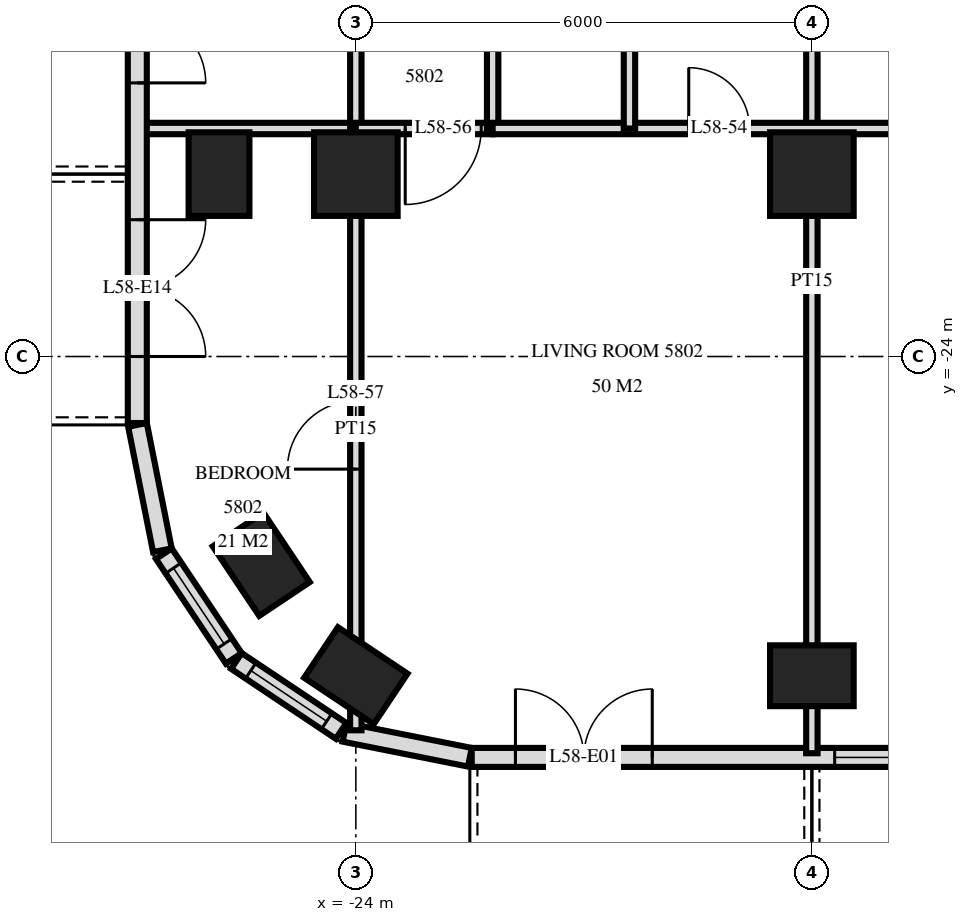
"""IFC4 building model, lengths in metres.
Left out: names, types, materials, properties, quantities, classifications, styles, units other than length and angle.
Written with IfcOpenShell. Run it as: python <this file> out.ifc"""

import sys

from ifc_helpers import new_model, si_unit, direction, frame, frame_2d, origin, origin_2d, place, context, subcontext, project, spatial, rectangle, extrude, element, fill, save


model = new_model("IFC4")
c1 = context("Model", 3, precision=1e-05, world=origin(), true_north=direction((0.0, 1.0)))
c2 = subcontext(c1, "Body", "Model", "MODEL_VIEW")
j1 = project(units=[si_unit("LENGTHUNIT", "METRE"), si_unit("PLANEANGLEUNIT", "RADIAN")], contexts=[c1])
p1 = place(None, origin())
s1 = spatial("IfcSite", under=j1, at=p1, CompositionType="ELEMENT")
p2 = place(p1, origin())
s2 = spatial("IfcBuilding", under=s1, at=p2, CompositionType="ELEMENT")
p3 = place(p2, frame((0.0, 0.0, 222.1)))
s3 = spatial("IfcBuildingStorey", under=s2, at=p3, CompositionType="ELEMENT", Elevation=222.1)
for number, where, z_axis, x_axis in (
    (1, (-25.8, -21.6, 0.0), (0.0, 0.0, 1.0), (0.0, 1.0, 0.0)),
    (2, (-25.244, -26.733, 0.0), (0.0, 0.0, 1.0), (-0.556, 0.831, 0.0)),
    (3, (-24.0, -28.2, 0.0), (0.0, 0.0, 1.0), (-0.831, 0.556, 0.0)),
):
    element("IfcColumn", number, at=place(p3, frame(where, z_axis=z_axis, x_axis=x_axis)), inside=s3, PredefinedType="COLUMN", context=c2, shape_type="SweptSolid", body=[
        extrude(rectangle(XDim=1.1, YDim=0.8, at=origin_2d()), origin(), (0.0, 0.0, 1.0), 3.5),
    ])
p4 = place(p3, frame((-24.0, -21.6, 0.0), z_axis=(0.0, 0.0, 1.0), x_axis=(1.0, 0.0, 0.0)))
e4 = element("IfcColumn", 4, at=p4, inside=s3, PredefinedType="COLUMN", context=c2, shape_type="SweptSolid", body=[
    extrude(rectangle(XDim=1.1, YDim=1.1, at=origin_2d()), origin(), (0.0, 0.0, 1.0), 3.5),
])
p5 = place(p3, frame((-18.0, -28.2, 0.0), z_axis=(0.0, 0.0, 1.0), x_axis=(1.0, 0.0, 0.0)))
e5 = element("IfcColumn", 5, at=p5, inside=s3, PredefinedType="COLUMN", context=c2, shape_type="SweptSolid", body=[
    extrude(rectangle(XDim=1.1, YDim=0.8, at=origin_2d()), origin(), (0.0, 0.0, 1.0), 3.5),
])
p6 = place(p3, frame((-18.0, -21.6, 0.0), z_axis=(0.0, 0.0, 1.0), x_axis=(1.0, 0.0, 0.0)))
e6 = element("IfcColumn", 6, at=p6, inside=s3, PredefinedType="COLUMN", context=c2, shape_type="SweptSolid", body=[
    extrude(rectangle(XDim=1.1, YDim=1.1, at=origin_2d()), origin(), (0.0, 0.0, 1.0), 3.5),
])
p7 = place(p3, frame((-26.875, -3.325, 0.0), z_axis=(0.0, 0.0, 1.0), x_axis=(0.0, -1.0, 0.0)))
e7 = element("IfcWall", 7, at=p7, inside=s3, PredefinedType="SOLIDWALL", context=c2, shape_type="SweptSolid", body=[
    extrude(rectangle(XDim=21.551, YDim=0.25, at=frame_2d((10.775, 0.0))), origin(), (0.0, 0.0, 1.0), 3.22),
])
p8 = place(p7, frame((7.275, 0.0, 0.0)))
e8 = element("IfcOpeningElement", 8, at=p8, cuts=e7, PredefinedType="OPENING", context=c2, shape_type="SweptSolid", body=[
    extrude(rectangle(XDim=1.8, YDim=2.4, at=frame_2d((0.9, 1.2))), frame((0.0, 0.135, 0.0), z_axis=(0.0, -1.0, 0.0), x_axis=(1.0, 0.0, 0.0)), (0.0, 0.0, 1.0), 0.27),
])
p9 = place(p7, frame((15.275, 0.0, 0.0)))
e9 = element("IfcOpeningElement", 9, at=p9, cuts=e7, PredefinedType="OPENING", context=c2, shape_type="SweptSolid", body=[
    extrude(rectangle(XDim=1.8, YDim=2.4, at=frame_2d((0.9, 1.2))), frame((0.0, 0.135, 0.0), z_axis=(0.0, -1.0, 0.0), x_axis=(1.0, 0.0, 0.0)), (0.0, 0.0, 1.0), 0.27),
])
p10 = place(p7, frame((18.875, 0.0, 0.0)))
e10 = element("IfcOpeningElement", 10, at=p10, cuts=e7, PredefinedType="OPENING", context=c2, shape_type="SweptSolid", body=[
    extrude(rectangle(XDim=1.8, YDim=2.4, at=frame_2d((0.9, 1.2))), frame((0.0, 0.135, 0.0), z_axis=(0.0, -1.0, 0.0), x_axis=(1.0, 0.0, 0.0)), (0.0, 0.0, 1.0), 0.27),
])
p11 = place(p3, frame((-26.873, -24.9, 0.0), z_axis=(0.0, 0.0, 1.0), x_axis=(0.195026884138, -0.980797896849, 0.0)))
e11 = element("IfcWall", 11, at=p11, inside=s3, PredefinedType="SOLIDWALL", context=c2, shape_type="SweptSolid", body=[
    extrude(rectangle(XDim=1.681, YDim=0.25, at=frame_2d((0.841, 0.0))), origin(), (0.0, 0.0, 1.0), 3.22),
])
p12 = place(p3, frame((-26.526, -26.594, 0.0), z_axis=(0.0, 0.0, 1.0), x_axis=(0.55555029066, -0.831482937015, 0.0)))
e12 = element("IfcWall", 12, at=p12, inside=s3, PredefinedType="SOLIDWALL", context=c2, shape_type="SweptSolid", body=[
    extrude(rectangle(XDim=1.656, YDim=0.25, at=frame_2d((0.828, 0.0))), origin(), (0.0, 0.0, 1.0), 3.22),
])
p13 = place(p12, frame((0.228, 0.0, 0.9)))
e13 = element("IfcOpeningElement", 13, at=p13, cuts=e12, PredefinedType="OPENING", context=c2, shape_type="SweptSolid", body=[
    extrude(rectangle(XDim=1.2, YDim=1.5, at=frame_2d((0.6, 0.75))), frame((0.0, 0.135, 0.0), z_axis=(0.0, -1.0, 0.0), x_axis=(1.0, 0.0, 0.0)), (0.0, 0.0, 1.0), 0.27),
])
p14 = place(p3, frame((-25.571, -28.006, 0.0), z_axis=(0.0, 0.0, 1.0), x_axis=(0.831482937015, -0.55555029066, 0.0)))
e14 = element("IfcWall", 14, at=p14, inside=s3, PredefinedType="SOLIDWALL", context=c2, shape_type="SweptSolid", body=[
    extrude(rectangle(XDim=1.656, YDim=0.25, at=frame_2d((0.828, 0.0))), origin(), (0.0, 0.0, 1.0), 3.22),
])
p15 = place(p14, frame((0.228, 0.0, 0.9)))
e15 = element("IfcOpeningElement", 15, at=p15, cuts=e14, PredefinedType="OPENING", context=c2, shape_type="SweptSolid", body=[
    extrude(rectangle(XDim=1.2, YDim=1.5, at=frame_2d((0.6, 0.75))), frame((0.0, 0.135, 0.0), z_axis=(0.0, -1.0, 0.0), x_axis=(1.0, 0.0, 0.0)), (0.0, 0.0, 1.0), 0.27),
])
p16 = place(p3, frame((-24.149, -28.945, 0.0), z_axis=(0.0, 0.0, 1.0), x_axis=(0.980775640221, -0.19513878023, 0.0)))
e16 = element("IfcWall", 16, at=p16, inside=s3, PredefinedType="SOLIDWALL", context=c2, shape_type="SweptSolid", body=[
    extrude(rectangle(XDim=1.681, YDim=0.25, at=frame_2d((0.841, 0.0))), origin(), (0.0, 0.0, 1.0), 3.22),
])
p17 = place(p3, frame((-22.475, -29.275, 0.0), z_axis=(0.0, 0.0, 1.0), x_axis=(1.0, 0.0, 0.0)))
e17 = element("IfcWall", 17, at=p17, inside=s3, PredefinedType="SOLIDWALL", context=c2, shape_type="SweptSolid", body=[
    extrude(rectangle(XDim=44.951, YDim=0.25, at=frame_2d((22.475, 0.0))), origin(), (0.0, 0.0, 1.0), 3.22),
])
p18 = place(p17, frame((0.575, 0.0, 0.0)))
e18 = element("IfcOpeningElement", 18, at=p18, cuts=e17, PredefinedType="OPENING", context=c2, shape_type="SweptSolid", body=[
    extrude(rectangle(XDim=1.8, YDim=2.4, at=frame_2d((0.9, 1.2))), frame((0.0, 0.135, 0.0), z_axis=(0.0, -1.0, 0.0), x_axis=(1.0, 0.0, 0.0)), (0.0, 0.0, 1.0), 0.27),
])
p19 = place(p17, frame((4.775, 0.0, 0.9)))
e19 = element("IfcOpeningElement", 19, at=p19, cuts=e17, PredefinedType="OPENING", context=c2, shape_type="SweptSolid", body=[
    extrude(rectangle(XDim=2.4, YDim=1.5, at=frame_2d((1.2, 0.75))), frame((0.0, 0.135, 0.0), z_axis=(0.0, -1.0, 0.0), x_axis=(1.0, 0.0, 0.0)), (0.0, 0.0, 1.0), 0.27),
])
p20 = place(p17, frame((8.075, 0.0, 0.0)))
e20 = element("IfcOpeningElement", 20, at=p20, cuts=e17, PredefinedType="OPENING", context=c2, shape_type="SweptSolid", body=[
    extrude(rectangle(XDim=1.8, YDim=2.4, at=frame_2d((0.9, 1.2))), frame((0.0, 0.135, 0.0), z_axis=(0.0, -1.0, 0.0), x_axis=(1.0, 0.0, 0.0)), (0.0, 0.0, 1.0), 0.27),
])
p21 = place(p17, frame((11.075, 0.0, 0.0)))
e21 = element("IfcOpeningElement", 21, at=p21, cuts=e17, PredefinedType="OPENING", context=c2, shape_type="SweptSolid", body=[
    extrude(rectangle(XDim=1.8, YDim=2.4, at=frame_2d((0.9, 1.2))), frame((0.0, 0.135, 0.0), z_axis=(0.0, -1.0, 0.0), x_axis=(1.0, 0.0, 0.0)), (0.0, 0.0, 1.0), 0.27),
])
p22 = place(p17, frame((13.775, 0.0, 0.9)))
e22 = element("IfcOpeningElement", 22, at=p22, cuts=e17, PredefinedType="OPENING", context=c2, shape_type="SweptSolid", body=[
    extrude(rectangle(XDim=2.4, YDim=1.5, at=frame_2d((1.2, 0.75))), frame((0.0, 0.135, 0.0), z_axis=(0.0, -1.0, 0.0), x_axis=(1.0, 0.0, 0.0)), (0.0, 0.0, 1.0), 0.27),
])
p23 = place(p17, frame((16.775, 0.0, 0.9)))
e23 = element("IfcOpeningElement", 23, at=p23, cuts=e17, PredefinedType="OPENING", context=c2, shape_type="SweptSolid", body=[
    extrude(rectangle(XDim=2.4, YDim=1.5, at=frame_2d((1.2, 0.75))), frame((0.0, 0.135, 0.0), z_axis=(0.0, -1.0, 0.0), x_axis=(1.0, 0.0, 0.0)), (0.0, 0.0, 1.0), 0.27),
])
p24 = place(p17, frame((20.075, 0.0, 0.0)))
e24 = element("IfcOpeningElement", 24, at=p24, cuts=e17, PredefinedType="OPENING", context=c2, shape_type="SweptSolid", body=[
    extrude(rectangle(XDim=1.8, YDim=2.4, at=frame_2d((0.9, 1.2))), frame((0.0, 0.135, 0.0), z_axis=(0.0, -1.0, 0.0), x_axis=(1.0, 0.0, 0.0)), (0.0, 0.0, 1.0), 0.27),
])
p25 = place(p17, frame((23.075, 0.0, 0.0)))
e25 = element("IfcOpeningElement", 25, at=p25, cuts=e17, PredefinedType="OPENING", context=c2, shape_type="SweptSolid", body=[
    extrude(rectangle(XDim=1.8, YDim=2.4, at=frame_2d((0.9, 1.2))), frame((0.0, 0.135, 0.0), z_axis=(0.0, -1.0, 0.0), x_axis=(1.0, 0.0, 0.0)), (0.0, 0.0, 1.0), 0.27),
])
p26 = place(p17, frame((25.775, 0.0, 0.9)))
e26 = element("IfcOpeningElement", 26, at=p26, cuts=e17, PredefinedType="OPENING", context=c2, shape_type="SweptSolid", body=[
    extrude(rectangle(XDim=2.4, YDim=1.5, at=frame_2d((1.2, 0.75))), frame((0.0, 0.135, 0.0), z_axis=(0.0, -1.0, 0.0), x_axis=(1.0, 0.0, 0.0)), (0.0, 0.0, 1.0), 0.27),
])
p27 = place(p17, frame((29.075, 0.0, 0.0)))
e27 = element("IfcOpeningElement", 27, at=p27, cuts=e17, PredefinedType="OPENING", context=c2, shape_type="SweptSolid", body=[
    extrude(rectangle(XDim=1.8, YDim=2.4, at=frame_2d((0.9, 1.2))), frame((0.0, 0.135, 0.0), z_axis=(0.0, -1.0, 0.0), x_axis=(1.0, 0.0, 0.0)), (0.0, 0.0, 1.0), 0.27),
])
p28 = place(p17, frame((31.775, 0.0, 0.9)))
e28 = element("IfcOpeningElement", 28, at=p28, cuts=e17, PredefinedType="OPENING", context=c2, shape_type="SweptSolid", body=[
    extrude(rectangle(XDim=2.4, YDim=1.5, at=frame_2d((1.2, 0.75))), frame((0.0, 0.135, 0.0), z_axis=(0.0, -1.0, 0.0), x_axis=(1.0, 0.0, 0.0)), (0.0, 0.0, 1.0), 0.27),
])
p29 = place(p17, frame((35.075, 0.0, 0.0)))
e29 = element("IfcOpeningElement", 29, at=p29, cuts=e17, PredefinedType="OPENING", context=c2, shape_type="SweptSolid", body=[
    extrude(rectangle(XDim=1.8, YDim=2.4, at=frame_2d((0.9, 1.2))), frame((0.0, 0.135, 0.0), z_axis=(0.0, -1.0, 0.0), x_axis=(1.0, 0.0, 0.0)), (0.0, 0.0, 1.0), 0.27),
])
p30 = place(p17, frame((41.075, 0.0, 0.0)))
e30 = element("IfcOpeningElement", 30, at=p30, cuts=e17, PredefinedType="OPENING", context=c2, shape_type="SweptSolid", body=[
    extrude(rectangle(XDim=1.8, YDim=2.4, at=frame_2d((0.9, 1.2))), frame((0.0, 0.135, 0.0), z_axis=(0.0, -1.0, 0.0), x_axis=(1.0, 0.0, 0.0)), (0.0, 0.0, 1.0), 0.27),
])
p31 = place(p3, frame((-18.0, -29.22, 0.0), z_axis=(0.0, 0.0, 1.0), x_axis=(0.0, 1.0, 0.0)))
e31 = element("IfcWall", 31, at=p31, inside=s3, PredefinedType="PARTITIONING", context=c2, shape_type="SweptSolid", body=[
    extrude(rectangle(XDim=12.42, YDim=0.15, at=frame_2d((6.21, 0.0))), origin(), (0.0, 0.0, 1.0), 3.22),
])
for number, where, z_axis, x_axis in (
    (32, (-20.4, -21.0, 0.0), (0.0, 0.0, 1.0), (0.0, 1.0, 0.0)),
    (33, (-22.2, -21.0, 0.0), (0.0, 0.0, 1.0), (0.0, 1.0, 0.0)),
):
    element("IfcWall", number, at=place(p3, frame(where, z_axis=z_axis, x_axis=x_axis)), inside=s3, PredefinedType="PARTITIONING", context=c2, shape_type="SweptSolid", body=[
        extrude(rectangle(XDim=4.2, YDim=0.15, at=frame_2d((2.1, 0.0))), origin(), (0.0, 0.0, 1.0), 3.22),
    ])
p32 = place(p3, frame((-24.0, -21.0, 0.0), z_axis=(0.0, 0.0, 1.0), x_axis=(0.0, 1.0, 0.0)))
e34 = element("IfcWall", 34, at=p32, inside=s3, PredefinedType="PARTITIONING", context=c2, shape_type="SweptSolid", body=[
    extrude(rectangle(XDim=4.2, YDim=0.15, at=frame_2d((2.1, 0.0))), origin(), (0.0, 0.0, 1.0), 3.22),
])
p33 = place(p32, frame((1.58, 0.0, 0.0)))
e35 = element("IfcOpeningElement", 35, at=p33, cuts=e34, PredefinedType="OPENING", context=c2, shape_type="SweptSolid", body=[
    extrude(rectangle(XDim=1.0, YDim=2.1, at=frame_2d((0.5, 1.05))), frame((0.0, 0.085, 0.0), z_axis=(0.0, -1.0, 0.0), x_axis=(1.0, 0.0, 0.0)), (0.0, 0.0, 1.0), 0.17),
])
p34 = place(p3, frame((-24.0, -28.918, 0.0), z_axis=(0.0, 0.0, 1.0), x_axis=(0.0, 1.0, 0.0)))
e36 = element("IfcWall", 36, at=p34, inside=s3, PredefinedType="PARTITIONING", context=c2, shape_type="SweptSolid", body=[
    extrude(rectangle(XDim=7.918, YDim=0.15, at=frame_2d((3.959, 0.0))), origin(), (0.0, 0.0, 1.0), 3.22),
])
p35 = place(p34, frame((3.436, 0.0, 0.0)))
e37 = element("IfcOpeningElement", 37, at=p35, cuts=e36, PredefinedType="OPENING", context=c2, shape_type="SweptSolid", body=[
    extrude(rectangle(XDim=0.9, YDim=2.1, at=frame_2d((0.45, 1.05))), frame((0.0, 0.085, 0.0), z_axis=(0.0, -1.0, 0.0), x_axis=(1.0, 0.0, 0.0)), (0.0, 0.0, 1.0), 0.17),
])
p36 = place(p3, frame((-24.0, -21.0, 0.0), z_axis=(0.0, 0.0, 1.0), x_axis=(1.0, 0.0, 0.0)))
e38 = element("IfcWall", 38, at=p36, inside=s3, PredefinedType="PARTITIONING", context=c2, shape_type="SweptSolid", body=[
    extrude(rectangle(XDim=1.8, YDim=0.15, at=frame_2d((0.9, 0.0))), origin(), (0.0, 0.0, 1.0), 3.22),
])
p37 = place(p36, frame((0.65, 0.0, 0.0)))
e39 = element("IfcOpeningElement", 39, at=p37, cuts=e38, PredefinedType="OPENING", context=c2, shape_type="SweptSolid", body=[
    extrude(rectangle(XDim=1.0, YDim=2.1, at=frame_2d((0.5, 1.05))), frame((0.0, 0.085, 0.0), z_axis=(0.0, -1.0, 0.0), x_axis=(1.0, 0.0, 0.0)), (0.0, 0.0, 1.0), 0.17),
])
p38 = place(p3, frame((-26.82, -21.0, 0.0), z_axis=(0.0, 0.0, 1.0), x_axis=(1.0, 0.0, 0.0)))
e40 = element("IfcWall", 40, at=p38, inside=s3, PredefinedType="PARTITIONING", context=c2, shape_type="SweptSolid", body=[
    extrude(rectangle(XDim=2.82, YDim=0.15, at=frame_2d((1.41, 0.0))), origin(), (0.0, 0.0, 1.0), 3.22),
])
p39 = place(p3, frame((-22.2, -21.0, 0.0), z_axis=(0.0, 0.0, 1.0), x_axis=(1.0, 0.0, 0.0)))
e41 = element("IfcWall", 41, at=p39, inside=s3, PredefinedType="PARTITIONING", context=c2, shape_type="SweptSolid", body=[
    extrude(rectangle(XDim=6.3, YDim=0.15, at=frame_2d((3.15, 0.0))), origin(), (0.0, 0.0, 1.0), 3.22),
])
p40 = place(p39, frame((2.58, 0.0, 0.0)))
e42 = element("IfcOpeningElement", 42, at=p40, cuts=e41, PredefinedType="OPENING", context=c2, shape_type="SweptSolid", body=[
    extrude(rectangle(XDim=0.8, YDim=2.1, at=frame_2d((0.4, 1.05))), frame((0.0, 0.085, 0.0), z_axis=(0.0, -1.0, 0.0), x_axis=(1.0, 0.0, 0.0)), (0.0, 0.0, 1.0), 0.17),
])
p41 = place(p13, origin())
e43 = element("IfcWindow", 43, at=p41, inside=s3, PartitioningType="SINGLE_PANEL", PredefinedType="WINDOW", context=c2, shape_type="SweptSolid", body=[
    extrude(rectangle(XDim=1.2, YDim=1.5, at=frame_2d((0.6, 0.75))), frame((0.0, 0.03, 0.0), z_axis=(0.0, -1.0, 0.0), x_axis=(1.0, 0.0, 0.0)), (0.0, 0.0, 1.0), 0.06),
])
fill(e13, e43)
p42 = place(p15, origin())
e44 = element("IfcWindow", 44, at=p42, inside=s3, PartitioningType="SINGLE_PANEL", PredefinedType="WINDOW", context=c2, shape_type="SweptSolid", body=[
    extrude(rectangle(XDim=1.2, YDim=1.5, at=frame_2d((0.6, 0.75))), frame((0.0, 0.03, 0.0), z_axis=(0.0, -1.0, 0.0), x_axis=(1.0, 0.0, 0.0)), (0.0, 0.0, 1.0), 0.06),
])
fill(e15, e44)
p43 = place(p18, origin())
e45 = element("IfcDoor", 45, at=p43, inside=s3, OperationType="DOUBLE_DOOR_SINGLE_SWING", PredefinedType="DOOR", context=c2, shape_type="SweptSolid", body=[
    extrude(rectangle(XDim=1.8, YDim=2.4, at=frame_2d((0.9, 1.2))), frame((0.0, 0.025, 0.0), z_axis=(0.0, -1.0, 0.0), x_axis=(1.0, 0.0, 0.0)), (0.0, 0.0, 1.0), 0.05),
])
fill(e18, e45)
p44 = place(p19, origin())
e46 = element("IfcWindow", 46, at=p44, inside=s3, PartitioningType="SINGLE_PANEL", PredefinedType="WINDOW", context=c2, shape_type="SweptSolid", body=[
    extrude(rectangle(XDim=2.4, YDim=1.5, at=frame_2d((1.2, 0.75))), frame((0.0, 0.03, 0.0), z_axis=(0.0, -1.0, 0.0), x_axis=(1.0, 0.0, 0.0)), (0.0, 0.0, 1.0), 0.06),
])
fill(e19, e46)
p45 = place(p9, origin())
e47 = element("IfcDoor", 47, at=p45, inside=s3, OperationType="DOUBLE_DOOR_SINGLE_SWING", PredefinedType="DOOR", context=c2, shape_type="SweptSolid", body=[
    extrude(rectangle(XDim=1.8, YDim=2.4, at=frame_2d((0.9, 1.2))), frame((0.0, 0.025, 0.0), z_axis=(0.0, -1.0, 0.0), x_axis=(1.0, 0.0, 0.0)), (0.0, 0.0, 1.0), 0.05),
])
fill(e9, e47)
p46 = place(p10, origin())
e48 = element("IfcDoor", 48, at=p46, inside=s3, OperationType="DOUBLE_DOOR_SINGLE_SWING", PredefinedType="DOOR", context=c2, shape_type="SweptSolid", body=[
    extrude(rectangle(XDim=1.8, YDim=2.4, at=frame_2d((0.9, 1.2))), frame((0.0, 0.025, 0.0), z_axis=(0.0, -1.0, 0.0), x_axis=(1.0, 0.0, 0.0)), (0.0, 0.0, 1.0), 0.05),
])
fill(e10, e48)
p47 = place(p40, origin())
e49 = element("IfcDoor", 49, at=p47, inside=s3, OperationType="SINGLE_SWING_RIGHT", PredefinedType="DOOR", context=c2, shape_type="SweptSolid", body=[
    extrude(rectangle(XDim=0.8, YDim=2.1, at=frame_2d((0.4, 1.05))), frame((0.0, 0.025, 0.0), z_axis=(0.0, -1.0, 0.0), x_axis=(1.0, 0.0, 0.0)), (0.0, 0.0, 1.0), 0.05),
])
fill(e42, e49)
p48 = place(p37, frame((0.5, 0.0, 0.0), z_axis=(0.0, 0.0, 1.0), x_axis=(-1.0, 0.0, 0.0)))
e50 = element("IfcDoor", 50, at=p48, inside=s3, OperationType="SINGLE_SWING_LEFT", PredefinedType="DOOR", context=c2, shape_type="SweptSolid", body=[
    extrude(rectangle(XDim=1.0, YDim=2.1, at=frame_2d((0.0, 1.05))), frame((0.0, -0.025, 0.0), z_axis=(0.0, 1.0, 0.0), x_axis=(-1.0, 0.0, 0.0)), (0.0, 0.0, 1.0), 0.05),
])
fill(e39, e50)
p49 = place(p35, origin())
e51 = element("IfcDoor", 51, at=p49, inside=s3, OperationType="SINGLE_SWING_RIGHT", PredefinedType="DOOR", context=c2, shape_type="SweptSolid", body=[
    extrude(rectangle(XDim=0.9, YDim=2.1, at=frame_2d((0.45, 1.05))), frame((0.0, 0.025, 0.0), z_axis=(0.0, -1.0, 0.0), x_axis=(1.0, 0.0, 0.0)), (0.0, 0.0, 1.0), 0.05),
])
fill(e37, e51)
save(model, sys.argv[1])
